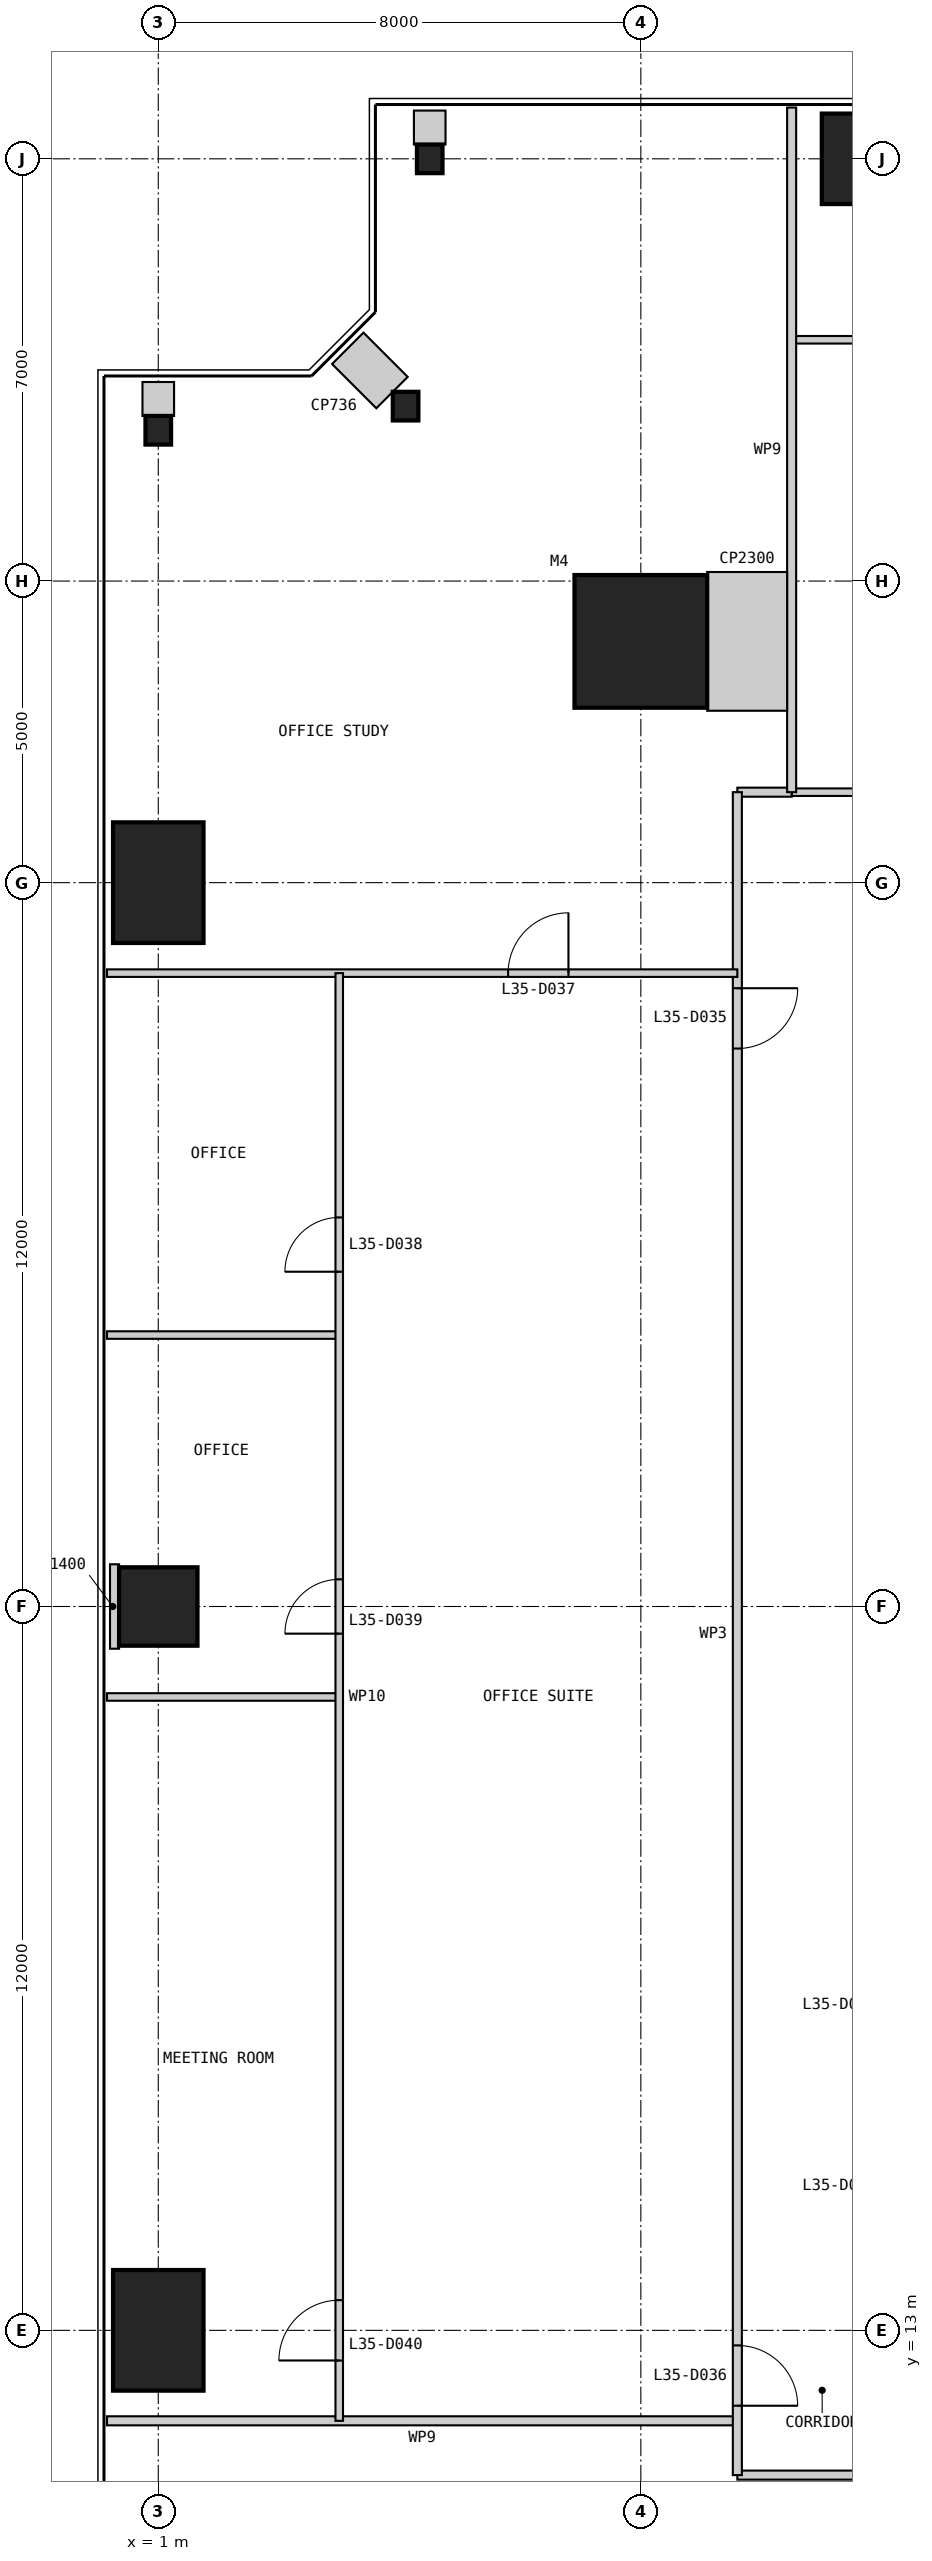
"""IFC4 building model, lengths in metres.
Left out: names, types, materials, properties, quantities, classifications, styles, units other than length and angle.
Written with IfcOpenShell. Run it as: python <this file> out.ifc"""

import sys

from ifc_helpers import new_model, si_unit, direction, frame, frame_2d, origin, origin_2d, place, context, subcontext, project, spatial, rectangle, i_section, extrude, element, fill, save


model = new_model("IFC4")
c1 = context("Model", 3, precision=1e-05, world=origin(), true_north=direction((0.0, 1.0)))
c2 = subcontext(c1, "Body", "Model", "MODEL_VIEW")
j1 = project(units=[si_unit("LENGTHUNIT", "METRE"), si_unit("PLANEANGLEUNIT", "RADIAN")], contexts=[c1])
p1 = place(None, origin())
s1 = spatial("IfcSite", under=j1, at=p1, CompositionType="ELEMENT")
p2 = place(p1, origin())
s2 = spatial("IfcBuilding", under=s1, at=p2, CompositionType="ELEMENT")
p3 = place(p2, frame((0.0, 0.0, 150.4)))
s3 = spatial("IfcBuildingStorey", under=s2, at=p3, CompositionType="ELEMENT", Elevation=150.4)
p4 = place(p3, frame((9.0, 41.0, 0.0), z_axis=(0.0, 0.0, 1.0), x_axis=(1.0, 0.0, 0.0)))
e1 = element("IfcColumn", 1, at=p4, inside=s3, PredefinedType="COLUMN", context=c2, shape_type="SweptSolid", body=[
    extrude(rectangle(XDim=2.2, YDim=2.2, at=origin_2d()), origin(), (0.0, 0.0, 1.0), 4.0),
])
p5 = place(p3, frame((13.0, 49.0, 0.0), z_axis=(0.0, 0.0, 1.0), x_axis=(1.0, 0.0, 0.0)))
e2 = element("IfcColumn", 2, at=p5, inside=s3, PredefinedType="COLUMN", context=c2, shape_type="SweptSolid", body=[
    extrude(rectangle(XDim=2.0, YDim=1.5, at=origin_2d()), origin(), (0.0, 0.0, 1.0), 4.0),
])
for number, where, z_axis, x_axis in (
    (3, (5.5, 49.0, 0.0), (0.0, 0.0, 1.0), (1.0, 0.0, 0.0)),
    (4, (5.1, 44.9, 0.0), (0.0, 0.0, 1.0), (1.0, 0.0, 0.0)),
    (5, (1.0, 44.5, 0.0), (0.0, 0.0, 1.0), (1.0, 0.0, 0.0)),
):
    element("IfcColumn", number, at=place(p3, frame(where, z_axis=z_axis, x_axis=x_axis)), inside=s3, PredefinedType="COLUMN", context=c2, shape_type="SweptSolid", body=[
        extrude(i_section(OverallWidth=0.424, OverallDepth=0.475, WebThickness=0.048, FlangeThickness=0.077, at=origin_2d()), origin(), (0.0, 0.0, 1.0), 4.0),
    ])
p6 = place(p3, frame((1.0, 37.0, 0.0), z_axis=(0.0, 0.0, 1.0), x_axis=(1.0, 0.0, 0.0)))
e6 = element("IfcColumn", 6, at=p6, inside=s3, PredefinedType="COLUMN", context=c2, shape_type="SweptSolid", body=[
    extrude(rectangle(XDim=1.5, YDim=2.0, at=origin_2d()), origin(), (0.0, 0.0, 1.0), 4.0),
])
p7 = place(p3, frame((1.0, 25.0, 0.0), z_axis=(0.0, 0.0, 1.0), x_axis=(1.0, 0.0, 0.0)))
e7 = element("IfcColumn", 7, at=p7, inside=s3, PredefinedType="COLUMN", context=c2, shape_type="SweptSolid", body=[
    extrude(rectangle(XDim=1.3, YDim=1.3, at=origin_2d()), origin(), (0.0, 0.0, 1.0), 4.0),
])
p8 = place(p3, frame((1.0, 13.0, 0.0), z_axis=(0.0, 0.0, 1.0), x_axis=(1.0, 0.0, 0.0)))
e8 = element("IfcColumn", 8, at=p8, inside=s3, PredefinedType="COLUMN", context=c2, shape_type="SweptSolid", body=[
    extrude(rectangle(XDim=1.5, YDim=2.0, at=origin_2d()), origin(), (0.0, 0.0, 1.0), 4.0),
])
p9 = place(p3, frame((10.6, 10.6, 0.0), z_axis=(0.0, 0.0, 1.0), x_axis=(1.0, 0.0, 0.0)))
e9 = element("IfcWall", 9, at=p9, inside=s3, PredefinedType="PARTITIONING", context=c2, shape_type="SweptSolid", body=[
    extrude(rectangle(XDim=28.8, YDim=0.15, at=frame_2d((14.4, 0.0))), origin(), (0.0, 0.0, 1.0), 3.85),
])
p10 = place(p9, frame((4.15, 0.0, 0.0)))
e10 = element("IfcOpeningElement", 10, at=p10, cuts=e9, PredefinedType="OPENING", context=c2, shape_type="SweptSolid", body=[
    extrude(rectangle(XDim=1.0, YDim=2.2, at=frame_2d((0.5, 1.1))), frame((0.0, 0.085, 0.0), z_axis=(0.0, -1.0, 0.0), x_axis=(1.0, 0.0, 0.0)), (0.0, 0.0, 1.0), 0.17),
])
p11 = place(p9, frame((26.65, 0.0, 0.0)))
e11 = element("IfcOpeningElement", 11, at=p11, cuts=e9, PredefinedType="OPENING", context=c2, shape_type="SweptSolid", body=[
    extrude(rectangle(XDim=1.0, YDim=2.2, at=frame_2d((0.5, 1.1))), frame((0.0, 0.085, 0.0), z_axis=(0.0, -1.0, 0.0), x_axis=(1.0, 0.0, 0.0)), (0.0, 0.0, 1.0), 0.17),
])
p12 = place(p3, frame((0.15, 11.5, 0.0), z_axis=(0.0, 0.0, 1.0), x_axis=(1.0, 0.0, 0.0)))
e12 = element("IfcWall", 12, at=p12, inside=s3, PredefinedType="PARTITIONING", context=c2, shape_type="SweptSolid", body=[
    extrude(rectangle(XDim=10.45, YDim=0.15, at=frame_2d((5.225, 0.0))), origin(), (0.0, 0.0, 1.0), 3.85),
])
p13 = place(p3, frame((17.5, 46.0, 0.0), z_axis=(0.0, 0.0, 1.0), x_axis=(-1.0, 0.0, 0.0)))
e13 = element("IfcWall", 13, at=p13, inside=s3, PredefinedType="PARTITIONING", context=c2, shape_type="SweptSolid", body=[
    extrude(rectangle(XDim=6.0, YDim=0.125, at=frame_2d((3.0, 0.0))), origin(), (0.0, 0.0, 1.0), 3.85),
])
p14 = place(p3, frame((14.5, 38.5, 0.0), z_axis=(0.0, 0.0, 1.0), x_axis=(-1.0, 0.0, 0.0)))
e14 = element("IfcWall", 14, at=p14, inside=s3, PredefinedType="PARTITIONING", context=c2, shape_type="SweptSolid", body=[
    extrude(rectangle(XDim=3.0, YDim=0.125, at=frame_2d((1.5, 0.0))), origin(), (0.0, 0.0, 1.0), 3.85),
])
p15 = place(p3, frame((11.5, 38.5, 0.0), z_axis=(0.0, 0.0, 1.0), x_axis=(-1.0, 0.0, 0.0)))
e15 = element("IfcWall", 15, at=p15, inside=s3, PredefinedType="PARTITIONING", context=c2, shape_type="SweptSolid", body=[
    extrude(rectangle(XDim=0.9, YDim=0.15, at=frame_2d((0.45, 0.0))), origin(), (0.0, 0.0, 1.0), 3.85),
])
p16 = place(p3, frame((10.6, 38.5, 0.0), z_axis=(0.0, 0.0, 1.0), x_axis=(0.0, -1.0, 0.0)))
e16 = element("IfcWall", 16, at=p16, inside=s3, PredefinedType="PARTITIONING", context=c2, shape_type="SweptSolid", body=[
    extrude(rectangle(XDim=27.9, YDim=0.15, at=frame_2d((13.95, 0.0))), origin(), (0.0, 0.0, 1.0), 3.85),
])
p17 = place(p16, frame((3.25, 0.0, 0.0)))
e17 = element("IfcOpeningElement", 17, at=p17, cuts=e16, PredefinedType="OPENING", context=c2, shape_type="SweptSolid", body=[
    extrude(rectangle(XDim=1.0, YDim=2.2, at=frame_2d((0.5, 1.1))), frame((0.0, 0.085, 0.0), z_axis=(0.0, -1.0, 0.0), x_axis=(1.0, 0.0, 0.0)), (0.0, 0.0, 1.0), 0.17),
])
p18 = place(p16, frame((25.75, 0.0, 0.0)))
e18 = element("IfcOpeningElement", 18, at=p18, cuts=e16, PredefinedType="OPENING", context=c2, shape_type="SweptSolid", body=[
    extrude(rectangle(XDim=1.0, YDim=2.2, at=frame_2d((0.5, 1.1))), frame((0.0, 0.085, 0.0), z_axis=(0.0, -1.0, 0.0), x_axis=(1.0, 0.0, 0.0)), (0.0, 0.0, 1.0), 0.17),
])
p19 = place(p3, frame((11.5, 49.85, 0.0), z_axis=(0.0, 0.0, 1.0), x_axis=(0.0, -1.0, 0.0)))
e19 = element("IfcWall", 19, at=p19, inside=s3, PredefinedType="PARTITIONING", context=c2, shape_type="SweptSolid", body=[
    extrude(rectangle(XDim=11.35, YDim=0.15, at=frame_2d((5.675, 0.0))), origin(), (0.0, 0.0, 1.0), 3.85),
])
p20 = place(p3, frame((0.15, 35.5, 0.0), z_axis=(0.0, 0.0, 1.0), x_axis=(1.0, 0.0, 0.0)))
e20 = element("IfcWall", 20, at=p20, inside=s3, PredefinedType="PARTITIONING", context=c2, shape_type="SweptSolid", body=[
    extrude(rectangle(XDim=10.45, YDim=0.125, at=frame_2d((5.225, 0.0))), origin(), (0.0, 0.0, 1.0), 3.85),
])
p21 = place(p20, frame((6.65, 0.0, 0.0)))
e21 = element("IfcOpeningElement", 21, at=p21, cuts=e20, PredefinedType="OPENING", context=c2, shape_type="SweptSolid", body=[
    extrude(rectangle(XDim=1.0, YDim=2.2, at=frame_2d((0.5, 1.1))), frame((0.0, 0.073, 0.0), z_axis=(0.0, -1.0, 0.0), x_axis=(1.0, 0.0, 0.0)), (0.0, 0.0, 1.0), 0.145),
])
for number, where, z_axis, x_axis in (
    (22, (0.15, 29.5, 0.0), (0.0, 0.0, 1.0), (1.0, 0.0, 0.0)),
    (23, (0.15, 23.5, 0.0), (0.0, 0.0, 1.0), (1.0, 0.0, 0.0)),
):
    element("IfcWall", number, at=place(p3, frame(where, z_axis=z_axis, x_axis=x_axis)), inside=s3, PredefinedType="PARTITIONING", context=c2, shape_type="SweptSolid", body=[
        extrude(rectangle(XDim=3.85, YDim=0.125, at=frame_2d((1.925, 0.0))), origin(), (0.0, 0.0, 1.0), 3.85),
    ])
p22 = place(p3, frame((4.0, 35.5, 0.0), z_axis=(0.0, 0.0, 1.0), x_axis=(0.0, -1.0, 0.0)))
e24 = element("IfcWall", 24, at=p22, inside=s3, PredefinedType="PARTITIONING", context=c2, shape_type="SweptSolid", body=[
    extrude(rectangle(XDim=24.0, YDim=0.125, at=frame_2d((12.0, 0.0))), origin(), (0.0, 0.0, 1.0), 3.238),
])
p23 = place(p22, frame((4.05, 0.0, 0.0)))
e25 = element("IfcOpeningElement", 25, at=p23, cuts=e24, PredefinedType="OPENING", context=c2, shape_type="SweptSolid", body=[
    extrude(rectangle(XDim=0.9, YDim=2.2, at=frame_2d((0.45, 1.1))), frame((0.0, 0.073, 0.0), z_axis=(0.0, -1.0, 0.0), x_axis=(1.0, 0.0, 0.0)), (0.0, 0.0, 1.0), 0.145),
])
p24 = place(p22, frame((10.05, 0.0, 0.0)))
e26 = element("IfcOpeningElement", 26, at=p24, cuts=e24, PredefinedType="OPENING", context=c2, shape_type="SweptSolid", body=[
    extrude(rectangle(XDim=0.9, YDim=2.2, at=frame_2d((0.45, 1.1))), frame((0.0, 0.073, 0.0), z_axis=(0.0, -1.0, 0.0), x_axis=(1.0, 0.0, 0.0)), (0.0, 0.0, 1.0), 0.145),
])
p25 = place(p22, frame((22.0, 0.0, 0.0)))
e27 = element("IfcOpeningElement", 27, at=p25, cuts=e24, PredefinedType="OPENING", context=c2, shape_type="SweptSolid", body=[
    extrude(rectangle(XDim=1.0, YDim=2.2, at=frame_2d((0.5, 1.1))), frame((0.0, 0.073, 0.0), z_axis=(0.0, -1.0, 0.0), x_axis=(1.0, 0.0, 0.0)), (0.0, 0.0, 1.0), 0.145),
])
p26 = place(p3, frame((11.425, 41.0, 0.0), z_axis=(0.0, 0.0, 1.0), x_axis=(-1.0, 0.0, 0.0)))
e28 = element("IfcWall", 28, at=p26, inside=s3, PredefinedType="PARTITIONING", context=c2, shape_type="SweptSolid", body=[
    extrude(rectangle(XDim=1.325, YDim=2.3, at=frame_2d((0.663, 0.0))), origin(), (0.0, 0.0, 1.0), 3.85),
])
p27 = place(p3, frame((5.5, 49.8, 0.0), z_axis=(0.0, 0.0, 1.0), x_axis=(0.0, -1.0, 0.0)))
e29 = element("IfcWall", 29, at=p27, inside=s3, PredefinedType="PARTITIONING", context=c2, shape_type="SweptSolid", body=[
    extrude(rectangle(XDim=0.562, YDim=0.524, at=frame_2d((0.281, 0.0))), origin(), (0.0, 0.0, 1.0), 3.85),
])
p28 = place(p3, frame((4.141, 45.859, 0.0), z_axis=(0.0, 0.0, 1.0), x_axis=(0.707106781187, -0.707106781187, 0.0)))
e30 = element("IfcWall", 30, at=p28, inside=s3, PredefinedType="PARTITIONING", context=c2, shape_type="SweptSolid", body=[
    extrude(rectangle(XDim=1.038, YDim=0.736, at=frame_2d((0.519, 0.0))), origin(), (0.0, 0.0, 1.0), 3.85),
])
p29 = place(p3, frame((1.0, 45.3, 0.0), z_axis=(0.0, 0.0, 1.0), x_axis=(0.0, -1.0, 0.0)))
e31 = element("IfcWall", 31, at=p29, inside=s3, PredefinedType="PARTITIONING", context=c2, shape_type="SweptSolid", body=[
    extrude(rectangle(XDim=0.562, YDim=0.524, at=frame_2d((0.281, 0.0))), origin(), (0.0, 0.0, 1.0), 3.85),
])
p30 = place(p3, frame((0.2, 25.0, 0.0), z_axis=(0.0, 0.0, 1.0), x_axis=(1.0, 0.0, 0.0)))
e32 = element("IfcWall", 32, at=p30, inside=s3, PredefinedType="PARTITIONING", context=c2, shape_type="SweptSolid", body=[
    extrude(rectangle(XDim=0.15, YDim=1.4, at=frame_2d((0.075, 0.0))), origin(), (0.0, 0.0, 1.0), 3.85),
])
p31 = place(p17, origin())
e33 = element("IfcDoor", 33, at=p31, inside=s3, OperationType="SINGLE_SWING_LEFT", PredefinedType="DOOR", context=c2, shape_type="SweptSolid", body=[
    extrude(rectangle(XDim=1.0, YDim=2.2, at=frame_2d((0.5, 1.1))), frame((0.0, 0.025, 0.0), z_axis=(0.0, -1.0, 0.0), x_axis=(1.0, 0.0, 0.0)), (0.0, 0.0, 1.0), 0.05),
])
fill(e17, e33)
p32 = place(p18, origin())
e34 = element("IfcDoor", 34, at=p32, inside=s3, OperationType="SINGLE_SWING_RIGHT", PredefinedType="DOOR", context=c2, shape_type="SweptSolid", body=[
    extrude(rectangle(XDim=1.0, YDim=2.2, at=frame_2d((0.5, 1.1))), frame((0.0, 0.025, 0.0), z_axis=(0.0, -1.0, 0.0), x_axis=(1.0, 0.0, 0.0)), (0.0, 0.0, 1.0), 0.05),
])
fill(e18, e34)
p33 = place(p21, origin())
e35 = element("IfcDoor", 35, at=p33, inside=s3, OperationType="SINGLE_SWING_RIGHT", PredefinedType="DOOR", context=c2, shape_type="SweptSolid", body=[
    extrude(rectangle(XDim=1.0, YDim=2.2, at=frame_2d((0.5, 1.1))), frame((0.0, 0.025, 0.0), z_axis=(0.0, -1.0, 0.0), x_axis=(1.0, 0.0, 0.0)), (0.0, 0.0, 1.0), 0.05),
])
fill(e21, e35)
p34 = place(p23, frame((0.9, 0.0, 0.0), z_axis=(0.0, 0.0, 1.0), x_axis=(-1.0, 0.0, 0.0)))
e36 = element("IfcDoor", 36, at=p34, inside=s3, OperationType="SINGLE_SWING_LEFT", PredefinedType="DOOR", context=c2, shape_type="SweptSolid", body=[
    extrude(rectangle(XDim=0.9, YDim=2.2, at=frame_2d((0.45, 1.1))), frame((0.0, 0.025, 0.0), z_axis=(0.0, -1.0, 0.0), x_axis=(1.0, 0.0, 0.0)), (0.0, 0.0, 1.0), 0.05),
])
fill(e25, e36)
p35 = place(p24, frame((0.9, 0.0, 0.0), z_axis=(0.0, 0.0, 1.0), x_axis=(-1.0, 0.0, 0.0)))
e37 = element("IfcDoor", 37, at=p35, inside=s3, OperationType="SINGLE_SWING_LEFT", PredefinedType="DOOR", context=c2, shape_type="SweptSolid", body=[
    extrude(rectangle(XDim=0.9, YDim=2.2, at=frame_2d((0.45, 1.1))), frame((0.0, 0.025, 0.0), z_axis=(0.0, -1.0, 0.0), x_axis=(1.0, 0.0, 0.0)), (0.0, 0.0, 1.0), 0.05),
])
fill(e26, e37)
p36 = place(p25, frame((1.0, 0.0, 0.0), z_axis=(0.0, 0.0, 1.0), x_axis=(-1.0, 0.0, 0.0)))
e38 = element("IfcDoor", 38, at=p36, inside=s3, OperationType="SINGLE_SWING_LEFT", PredefinedType="DOOR", context=c2, shape_type="SweptSolid", body=[
    extrude(rectangle(XDim=1.0, YDim=2.2, at=frame_2d((0.5, 1.1))), frame((0.0, 0.025, 0.0), z_axis=(0.0, -1.0, 0.0), x_axis=(1.0, 0.0, 0.0)), (0.0, 0.0, 1.0), 0.05),
])
fill(e27, e38)
save(model, sys.argv[1])
